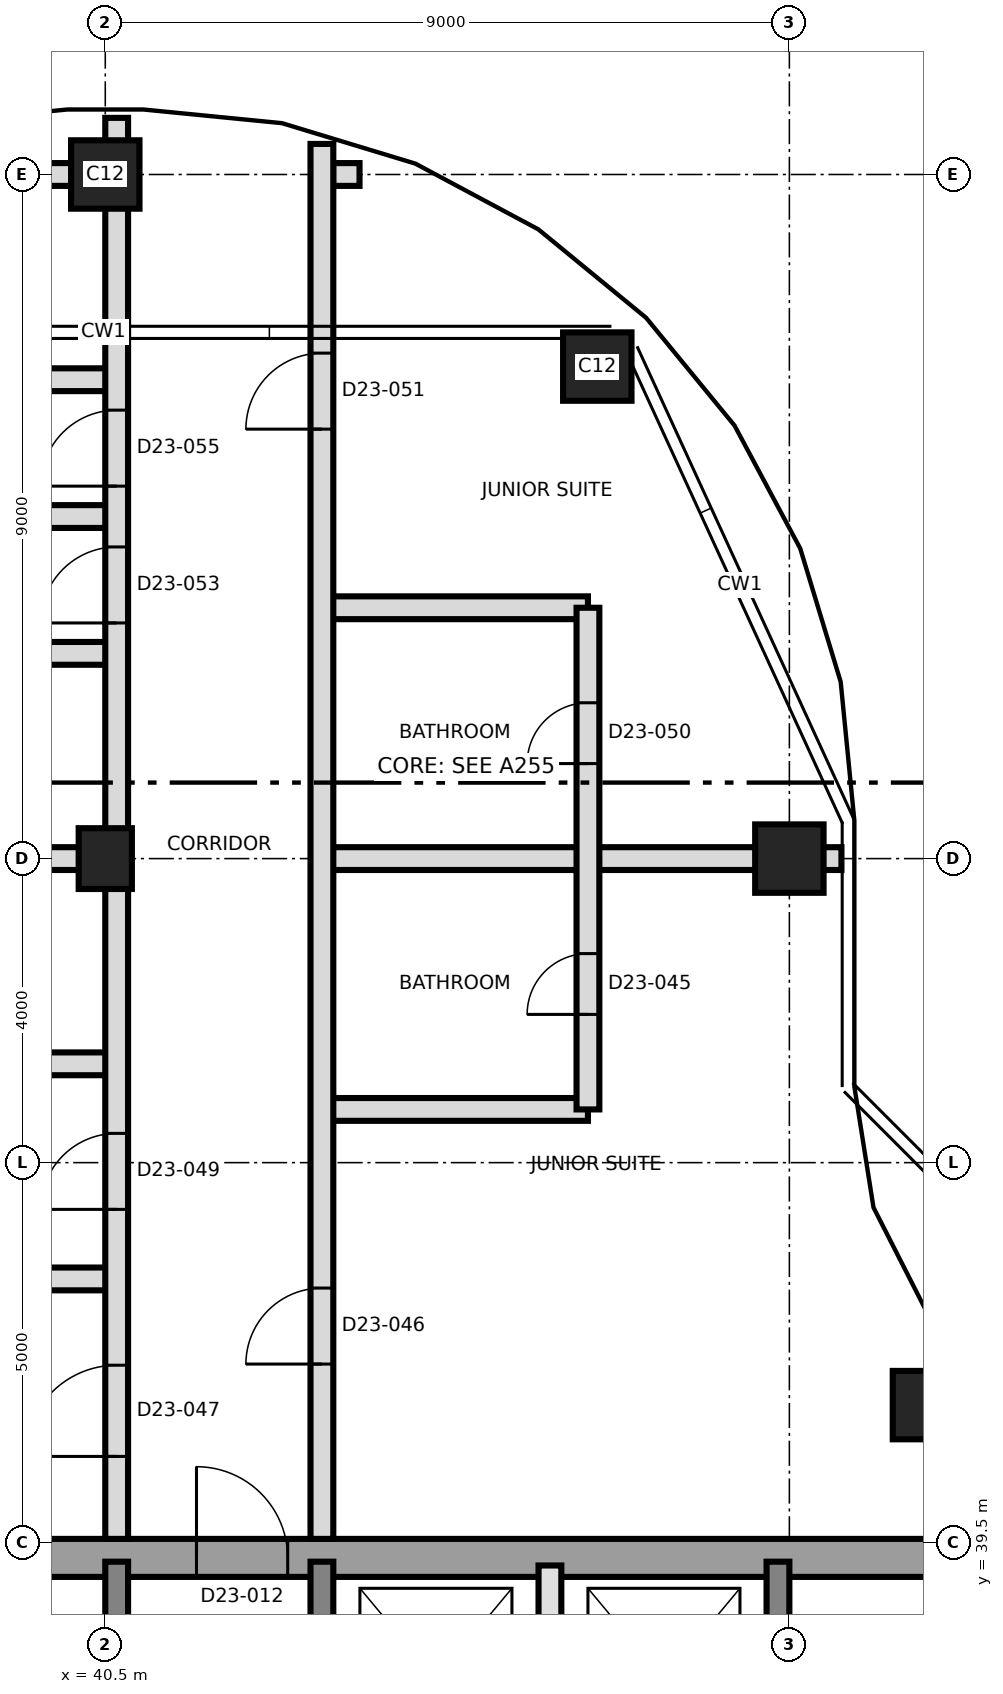
"""IFC4 building model, lengths in metres.
Left out: names, types, materials, properties, quantities, classifications, styles, units other than length and angle.
Written with IfcOpenShell. Run it as: python <this file> out.ifc"""

import sys

from ifc_helpers import new_model, si_unit, direction, frame, frame_2d, origin, origin_2d, place, context, subcontext, project, spatial, rectangle, extrude, element, fill, save


model = new_model("IFC4")
c1 = context("Model", 3, precision=1e-05, world=origin(), true_north=direction((0.0, 1.0)))
c2 = subcontext(c1, "Body", "Model", "MODEL_VIEW")
j1 = project(units=[si_unit("LENGTHUNIT", "METRE"), si_unit("PLANEANGLEUNIT", "RADIAN")], contexts=[c1])
p1 = place(None, origin())
s1 = spatial("IfcSite", under=j1, at=p1, CompositionType="ELEMENT")
p2 = place(p1, origin())
s2 = spatial("IfcBuilding", under=s1, at=p2, CompositionType="ELEMENT")
p3 = place(p2, frame((0.0, 0.0, 210.6)))
s3 = spatial("IfcBuildingStorey", under=s2, at=p3, CompositionType="ELEMENT", Elevation=210.6)
p4 = place(p3, frame((31.25, 39.3, 0.0), z_axis=(0.0, 0.0, 1.0), x_axis=(1.0, 0.0, 0.0)))
e1 = element("IfcWall", 1, at=p4, inside=s3, PredefinedType="SHEAR", context=c2, shape_type="SweptSolid", body=[
    extrude(rectangle(XDim=27.0, YDim=0.5, at=frame_2d((13.5, 0.0))), origin(), (0.0, 0.0, 1.0), 3.7),
])
p5 = place(p4, frame((10.45, 0.0, 0.0)))
e2 = element("IfcOpeningElement", 2, at=p5, cuts=e1, PredefinedType="OPENING", context=c2, shape_type="SweptSolid", body=[
    extrude(rectangle(XDim=1.2, YDim=2.1, at=frame_2d((0.6, 1.05))), frame((0.0, 0.26, 0.0), z_axis=(0.0, -1.0, 0.0), x_axis=(1.0, 0.0, 0.0)), (0.0, 0.0, 1.0), 0.52),
])
for number, where, z_axis, x_axis in (
    (3, (40.65, 33.5, 0.0), (0.0, 0.0, 1.0), (0.0, 1.0, 0.0)),
    (4, (43.35, 33.5, 0.0), (0.0, 0.0, 1.0), (0.0, 1.0, 0.0)),
    (5, (49.35, 33.5, 0.0), (0.0, 0.0, 1.0), (0.0, 1.0, 0.0)),
):
    element("IfcWall", number, at=place(p3, frame(where, z_axis=z_axis, x_axis=x_axis)), inside=s3, PredefinedType="SHEAR", context=c2, shape_type="SweptSolid", body=[
        extrude(rectangle(XDim=5.75, YDim=0.3, at=frame_2d((2.875, 0.0))), origin(), (0.0, 0.0, 1.0), 3.7),
    ])
p6 = place(p3, frame((51.31, 41.31, 0.0), z_axis=(0.0, 0.0, 1.0), x_axis=(1.0, 0.0, 0.0)))
e6 = element("IfcColumn", 6, at=p6, inside=s3, PredefinedType="COLUMN", context=c2, shape_type="SweptSolid", body=[
    extrude(rectangle(XDim=0.9, YDim=0.9, at=origin_2d()), origin(), (0.0, 0.0, 1.0), 3.7),
])
p7 = place(p3, frame((40.5, 48.5, 0.0), z_axis=(0.0, 0.0, 1.0), x_axis=(0.0, 1.0, 0.0)))
e7 = element("IfcColumn", 7, at=p7, inside=s3, PredefinedType="COLUMN", context=c2, shape_type="SweptSolid", body=[
    extrude(rectangle(XDim=0.8, YDim=0.7, at=origin_2d()), origin(), (0.0, 0.0, 1.0), 3.7),
])
for number, where, z_axis, x_axis in (
    (8, (49.5, 48.5, 0.0), (0.0, 0.0, 1.0), (1.0, 0.0, 0.0)),
    (9, (46.973, 54.973, 0.0), (0.0, 0.0, 1.0), (1.0, 0.0, 0.0)),
    (10, (40.5, 57.5, 0.0), (0.0, 0.0, 1.0), (1.0, 0.0, 0.0)),
):
    element("IfcColumn", number, at=place(p3, frame(where, z_axis=z_axis, x_axis=x_axis)), inside=s3, PredefinedType="COLUMN", context=c2, shape_type="SweptSolid", body=[
        extrude(rectangle(XDim=0.9, YDim=0.9, at=origin_2d()), origin(), (0.0, 0.0, 1.0), 3.7),
    ])
p8 = place(p3, frame((46.35, 36.2, 0.0), z_axis=(0.0, 0.0, 1.0), x_axis=(0.0, 1.0, 0.0)))
e11 = element("IfcWall", 11, at=p8, inside=s3, PredefinedType="SOLIDWALL", context=c2, shape_type="SweptSolid", body=[
    extrude(rectangle(XDim=3.0, YDim=0.3, at=frame_2d((1.5, 0.0))), origin(), (0.0, 0.0, 1.0), 3.4),
])
p9 = place(p3, frame((30.995, 42.97, 0.0), z_axis=(0.0, 0.0, 1.0), x_axis=(1.0, 0.0, 0.0)))
e12 = element("IfcWall", 12, at=p9, inside=s3, PredefinedType="PARTITIONING", context=c2, shape_type="SweptSolid", body=[
    extrude(rectangle(XDim=9.655, YDim=0.3, at=frame_2d((4.827, 0.0))), origin(), (0.0, 0.0, 1.0), 3.35),
])
p10 = place(p3, frame((43.35, 45.2, 0.0), z_axis=(0.0, 0.0, 1.0), x_axis=(1.0, 0.0, 0.0)))
e13 = element("IfcWall", 13, at=p10, inside=s3, PredefinedType="PARTITIONING", context=c2, shape_type="SweptSolid", body=[
    extrude(rectangle(XDim=3.5, YDim=0.3, at=frame_2d((1.75, 0.0))), origin(), (0.0, 0.0, 1.0), 3.4),
])
p11 = place(p3, frame((37.45, 45.8, 0.0), z_axis=(0.0, 0.0, 1.0), x_axis=(1.0, 0.0, 0.0)))
e14 = element("IfcWall", 14, at=p11, inside=s3, PredefinedType="PARTITIONING", context=c2, shape_type="SweptSolid", body=[
    extrude(rectangle(XDim=3.2, YDim=0.3, at=frame_2d((1.6, 0.0))), origin(), (0.0, 0.0, 1.0), 3.4),
])
p12 = place(p3, frame((30.995, 48.5, 0.0), z_axis=(0.0, 0.0, 1.0), x_axis=(1.0, 0.0, 0.0)))
e15 = element("IfcWall", 15, at=p12, inside=s3, PredefinedType="PARTITIONING", context=c2, shape_type="SweptSolid", body=[
    extrude(rectangle(XDim=9.655, YDim=0.3, at=frame_2d((4.827, 0.0))), origin(), (0.0, 0.0, 1.0), 3.35),
])
p13 = place(p3, frame((43.35, 48.5, 0.0), z_axis=(0.0, 0.0, 1.0), x_axis=(1.0, 0.0, 0.0)))
e16 = element("IfcWall", 16, at=p13, inside=s3, PredefinedType="PARTITIONING", context=c2, shape_type="SweptSolid", body=[
    extrude(rectangle(XDim=6.835, YDim=0.3, at=frame_2d((3.417, 0.0))), origin(), (0.0, 0.0, 1.0), 3.35),
])
p14 = place(p3, frame((37.45, 51.2, 0.0), z_axis=(0.0, 0.0, 1.0), x_axis=(1.0, 0.0, 0.0)))
e17 = element("IfcWall", 17, at=p14, inside=s3, PredefinedType="PARTITIONING", context=c2, shape_type="SweptSolid", body=[
    extrude(rectangle(XDim=3.2, YDim=0.3, at=frame_2d((1.6, 0.0))), origin(), (0.0, 0.0, 1.0), 3.4),
])
p15 = place(p3, frame((43.35, 51.8, 0.0), z_axis=(0.0, 0.0, 1.0), x_axis=(1.0, 0.0, 0.0)))
e18 = element("IfcWall", 18, at=p15, inside=s3, PredefinedType="PARTITIONING", context=c2, shape_type="SweptSolid", body=[
    extrude(rectangle(XDim=3.5, YDim=0.3, at=frame_2d((1.75, 0.0))), origin(), (0.0, 0.0, 1.0), 3.4),
])
p16 = place(p3, frame((31.705, 53.0, 0.0), z_axis=(0.0, 0.0, 1.0), x_axis=(1.0, 0.0, 0.0)))
e19 = element("IfcWall", 19, at=p16, inside=s3, PredefinedType="PARTITIONING", context=c2, shape_type="SweptSolid", body=[
    extrude(rectangle(XDim=8.945, YDim=0.3, at=frame_2d((4.472, 0.0))), origin(), (0.0, 0.0, 1.0), 3.35),
])
p17 = place(p3, frame((37.45, 54.8, 0.0), z_axis=(0.0, 0.0, 1.0), x_axis=(1.0, 0.0, 0.0)))
e20 = element("IfcWall", 20, at=p17, inside=s3, PredefinedType="PARTITIONING", context=c2, shape_type="SweptSolid", body=[
    extrude(rectangle(XDim=3.2, YDim=0.3, at=frame_2d((1.6, 0.0))), origin(), (0.0, 0.0, 1.0), 3.4),
])
p18 = place(p3, frame((36.375, 57.5, 0.0), z_axis=(0.0, 0.0, 1.0), x_axis=(1.0, 0.0, 0.0)))
e21 = element("IfcWall", 21, at=p18, inside=s3, PredefinedType="PARTITIONING", context=c2, shape_type="SweptSolid", body=[
    extrude(rectangle(XDim=4.275, YDim=0.3, at=frame_2d((2.137, 0.0))), origin(), (0.0, 0.0, 1.0), 3.35),
])
p19 = place(p3, frame((43.498, 57.5, 0.0), z_axis=(0.0, 0.0, 1.0), x_axis=(1.0, 0.0, 0.0)))
e22 = element("IfcWall", 22, at=p19, inside=s3, PredefinedType="PARTITIONING", context=c2, shape_type="SweptSolid", body=[
    extrude(rectangle(XDim=0.347, YDim=0.3, at=frame_2d((0.173, 0.0))), origin(), (0.0, 0.0, 1.0), 3.35),
])
p20 = place(p3, frame((40.65, 39.55, 0.0), z_axis=(0.0, 0.0, 1.0), x_axis=(0.0, 1.0, 0.0)))
e23 = element("IfcWall", 23, at=p20, inside=s3, PredefinedType="PARTITIONING", context=c2, shape_type="SweptSolid", body=[
    extrude(rectangle(XDim=18.695, YDim=0.3, at=frame_2d((9.348, 0.0))), origin(), (0.0, 0.0, 1.0), 3.35),
])
p21 = place(p20, frame((1.085, 0.0, 0.0)))
e24 = element("IfcOpeningElement", 24, at=p21, cuts=e23, PredefinedType="OPENING", context=c2, shape_type="SweptSolid", body=[
    extrude(rectangle(XDim=1.2, YDim=2.1, at=frame_2d((0.6, 1.05))), frame((0.0, 0.16, 0.0), z_axis=(0.0, -1.0, 0.0), x_axis=(1.0, 0.0, 0.0)), (0.0, 0.0, 1.0), 0.32),
])
p22 = place(p20, frame((4.335, 0.0, 0.0)))
e25 = element("IfcOpeningElement", 25, at=p22, cuts=e23, PredefinedType="OPENING", context=c2, shape_type="SweptSolid", body=[
    extrude(rectangle(XDim=1.0, YDim=2.1, at=frame_2d((0.5, 1.05))), frame((0.0, 0.16, 0.0), z_axis=(0.0, -1.0, 0.0), x_axis=(1.0, 0.0, 0.0)), (0.0, 0.0, 1.0), 0.32),
])
p23 = place(p20, frame((12.05, 0.0, 0.0)))
e26 = element("IfcOpeningElement", 26, at=p23, cuts=e23, PredefinedType="OPENING", context=c2, shape_type="SweptSolid", body=[
    extrude(rectangle(XDim=1.0, YDim=2.1, at=frame_2d((0.5, 1.05))), frame((0.0, 0.16, 0.0), z_axis=(0.0, -1.0, 0.0), x_axis=(1.0, 0.0, 0.0)), (0.0, 0.0, 1.0), 0.32),
])
p24 = place(p20, frame((13.85, 0.0, 0.0)))
e27 = element("IfcOpeningElement", 27, at=p24, cuts=e23, PredefinedType="OPENING", context=c2, shape_type="SweptSolid", body=[
    extrude(rectangle(XDim=1.0, YDim=2.1, at=frame_2d((0.5, 1.05))), frame((0.0, 0.16, 0.0), z_axis=(0.0, -1.0, 0.0), x_axis=(1.0, 0.0, 0.0)), (0.0, 0.0, 1.0), 0.32),
])
p25 = place(p3, frame((43.35, 39.55, 0.0), z_axis=(0.0, 0.0, 1.0), x_axis=(0.0, 1.0, 0.0)))
e28 = element("IfcWall", 28, at=p25, inside=s3, PredefinedType="PARTITIONING", context=c2, shape_type="SweptSolid", body=[
    extrude(rectangle(XDim=18.352, YDim=0.3, at=frame_2d((9.176, 0.0))), origin(), (0.0, 0.0, 1.0), 3.35),
])
p26 = place(p25, frame((2.3, 0.0, 0.0)))
e29 = element("IfcOpeningElement", 29, at=p26, cuts=e28, PredefinedType="OPENING", context=c2, shape_type="SweptSolid", body=[
    extrude(rectangle(XDim=1.0, YDim=2.4, at=frame_2d((0.5, 1.2))), frame((0.0, 0.16, 0.0), z_axis=(0.0, -1.0, 0.0), x_axis=(1.0, 0.0, 0.0)), (0.0, 0.0, 1.0), 0.32),
])
p27 = place(p25, frame((14.6, 0.0, 0.0)))
e30 = element("IfcOpeningElement", 30, at=p27, cuts=e28, PredefinedType="OPENING", context=c2, shape_type="SweptSolid", body=[
    extrude(rectangle(XDim=1.0, YDim=2.4, at=frame_2d((0.5, 1.2))), frame((0.0, 0.16, 0.0), z_axis=(0.0, -1.0, 0.0), x_axis=(1.0, 0.0, 0.0)), (0.0, 0.0, 1.0), 0.32),
])
p28 = place(p3, frame((46.85, 45.2, 0.0), z_axis=(0.0, 0.0, 1.0), x_axis=(0.0, 1.0, 0.0)))
e31 = element("IfcWall", 31, at=p28, inside=s3, PredefinedType="PARTITIONING", context=c2, shape_type="SweptSolid", body=[
    extrude(rectangle(XDim=6.6, YDim=0.3, at=frame_2d((3.3, 0.0))), origin(), (0.0, 0.0, 1.0), 3.4),
])
p29 = place(p28, frame((1.25, 0.0, 0.0)))
e32 = element("IfcOpeningElement", 32, at=p29, cuts=e31, PredefinedType="OPENING", context=c2, shape_type="SweptSolid", body=[
    extrude(rectangle(XDim=0.8, YDim=2.1, at=frame_2d((0.4, 1.05))), frame((0.0, 0.16, 0.0), z_axis=(0.0, -1.0, 0.0), x_axis=(1.0, 0.0, 0.0)), (0.0, 0.0, 1.0), 0.32),
])
p30 = place(p28, frame((4.55, 0.0, 0.0)))
e33 = element("IfcOpeningElement", 33, at=p30, cuts=e31, PredefinedType="OPENING", context=c2, shape_type="SweptSolid", body=[
    extrude(rectangle(XDim=0.8, YDim=2.1, at=frame_2d((0.4, 1.05))), frame((0.0, 0.16, 0.0), z_axis=(0.0, -1.0, 0.0), x_axis=(1.0, 0.0, 0.0)), (0.0, 0.0, 1.0), 0.32),
])
p31 = place(p5, origin())
e34 = element("IfcDoor", 34, at=p31, inside=s3, OperationType="SINGLE_SWING_RIGHT", PredefinedType="DOOR", context=c2, shape_type="SweptSolid", body=[
    extrude(rectangle(XDim=1.2, YDim=2.1, at=frame_2d((0.6, 1.05))), frame((0.0, 0.025, 0.0), z_axis=(0.0, -1.0, 0.0), x_axis=(1.0, 0.0, 0.0)), (0.0, 0.0, 1.0), 0.05),
])
fill(e2, e34)
p32 = place(p29, origin())
e35 = element("IfcDoor", 35, at=p32, inside=s3, OperationType="SINGLE_SWING_LEFT", PredefinedType="DOOR", context=c2, shape_type="SweptSolid", body=[
    extrude(rectangle(XDim=0.8, YDim=2.1, at=frame_2d((0.4, 1.05))), frame((0.0, 0.025, 0.0), z_axis=(0.0, -1.0, 0.0), x_axis=(1.0, 0.0, 0.0)), (0.0, 0.0, 1.0), 0.05),
])
fill(e32, e35)
p33 = place(p26, origin())
e36 = element("IfcDoor", 36, at=p33, inside=s3, OperationType="SINGLE_SWING_LEFT", PredefinedType="DOOR", context=c2, shape_type="SweptSolid", body=[
    extrude(rectangle(XDim=1.0, YDim=2.4, at=frame_2d((0.5, 1.2))), frame((0.0, 0.025, 0.0), z_axis=(0.0, -1.0, 0.0), x_axis=(1.0, 0.0, 0.0)), (0.0, 0.0, 1.0), 0.05),
])
fill(e29, e36)
p34 = place(p21, origin())
e37 = element("IfcDoor", 37, at=p34, inside=s3, OperationType="SINGLE_SWING_RIGHT", PredefinedType="DOOR", context=c2, shape_type="SweptSolid", body=[
    extrude(rectangle(XDim=1.2, YDim=2.1, at=frame_2d((0.6, 1.05))), frame((0.0, 0.025, 0.0), z_axis=(0.0, -1.0, 0.0), x_axis=(1.0, 0.0, 0.0)), (0.0, 0.0, 1.0), 0.05),
])
fill(e24, e37)
p35 = place(p22, origin())
e38 = element("IfcDoor", 38, at=p35, inside=s3, OperationType="SINGLE_SWING_LEFT", PredefinedType="DOOR", context=c2, shape_type="SweptSolid", body=[
    extrude(rectangle(XDim=1.0, YDim=2.1, at=frame_2d((0.5, 1.05))), frame((0.0, 0.025, 0.0), z_axis=(0.0, -1.0, 0.0), x_axis=(1.0, 0.0, 0.0)), (0.0, 0.0, 1.0), 0.05),
])
fill(e25, e38)
p36 = place(p30, origin())
e39 = element("IfcDoor", 39, at=p36, inside=s3, OperationType="SINGLE_SWING_LEFT", PredefinedType="DOOR", context=c2, shape_type="SweptSolid", body=[
    extrude(rectangle(XDim=0.8, YDim=2.1, at=frame_2d((0.4, 1.05))), frame((0.0, 0.025, 0.0), z_axis=(0.0, -1.0, 0.0), x_axis=(1.0, 0.0, 0.0)), (0.0, 0.0, 1.0), 0.05),
])
fill(e33, e39)
p37 = place(p27, origin())
e40 = element("IfcDoor", 40, at=p37, inside=s3, OperationType="SINGLE_SWING_RIGHT", PredefinedType="DOOR", context=c2, shape_type="SweptSolid", body=[
    extrude(rectangle(XDim=1.0, YDim=2.4, at=frame_2d((0.5, 1.2))), frame((0.0, 0.025, 0.0), z_axis=(0.0, -1.0, 0.0), x_axis=(1.0, 0.0, 0.0)), (0.0, 0.0, 1.0), 0.05),
])
fill(e30, e40)
p38 = place(p23, origin())
e41 = element("IfcDoor", 41, at=p38, inside=s3, OperationType="SINGLE_SWING_LEFT", PredefinedType="DOOR", context=c2, shape_type="SweptSolid", body=[
    extrude(rectangle(XDim=1.0, YDim=2.1, at=frame_2d((0.5, 1.05))), frame((0.0, 0.025, 0.0), z_axis=(0.0, -1.0, 0.0), x_axis=(1.0, 0.0, 0.0)), (0.0, 0.0, 1.0), 0.05),
])
fill(e26, e41)
p39 = place(p24, origin())
e42 = element("IfcDoor", 42, at=p39, inside=s3, OperationType="SINGLE_SWING_LEFT", PredefinedType="DOOR", context=c2, shape_type="SweptSolid", body=[
    extrude(rectangle(XDim=1.0, YDim=2.1, at=frame_2d((0.5, 1.05))), frame((0.0, 0.025, 0.0), z_axis=(0.0, -1.0, 0.0), x_axis=(1.0, 0.0, 0.0)), (0.0, 0.0, 1.0), 0.05),
])
fill(e27, e42)
save(model, sys.argv[1])
